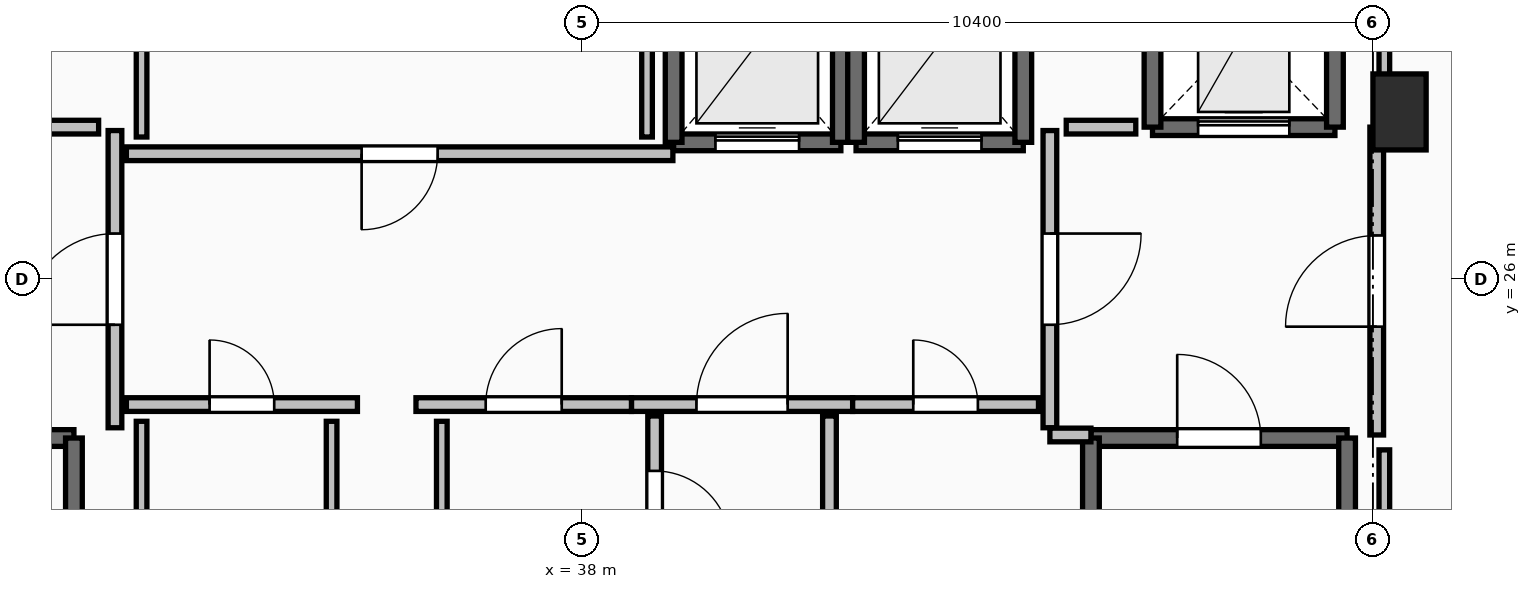
"""IFC4 building model, lengths in metres.
Left out: names, types, materials, properties, quantities, classifications, styles, units other than length and angle.
Written with IfcOpenShell. Run it as: python <this file> out.ifc"""

import sys

from ifc_helpers import new_model, si_unit, direction, frame, frame_2d, origin, origin_2d, place, context, subcontext, project, spatial, rectangle, extrude, element, fill, save


model = new_model("IFC4")
c1 = context("Model", 3, precision=1e-05, world=origin(), true_north=direction((0.0, 1.0)))
c2 = subcontext(c1, "Body", "Model", "MODEL_VIEW")
j1 = project(units=[si_unit("LENGTHUNIT", "METRE"), si_unit("PLANEANGLEUNIT", "RADIAN")], contexts=[c1])
p1 = place(None, origin())
s1 = spatial("IfcSite", under=j1, at=p1, CompositionType="ELEMENT")
p2 = place(p1, origin())
s2 = spatial("IfcBuilding", under=s1, at=p2, CompositionType="ELEMENT")
p3 = place(p2, frame((0.0, 0.0, 237.8)))
s3 = spatial("IfcBuildingStorey", under=s2, at=p3, CompositionType="ELEMENT", Elevation=237.8)
p4 = place(p3, frame((48.75, 28.2, 0.0), z_axis=(0.0, 0.0, 1.0), x_axis=(1.0, 0.0, 0.0)))
e1 = element("IfcColumn", 1, at=p4, inside=s3, PredefinedType="PILASTER", context=c2, shape_type="SweptSolid", body=[
    extrude(rectangle(XDim=0.7, YDim=1.0, at=origin_2d()), origin(), (0.0, 0.0, 1.0), 3.55),
])
p5 = place(p3, frame((27.94, 23.91, 0.0), z_axis=(0.0, 0.0, 1.0), x_axis=(1.0, 0.0, 0.0)))
e2 = element("IfcWall", 2, at=p5, inside=s3, PredefinedType="SOLIDWALL", context=c2, shape_type="SweptSolid", body=[
    extrude(rectangle(XDim=3.37, YDim=0.22, at=frame_2d((1.685, 0.0))), origin(), (0.0, 0.0, 1.0), 3.29),
])
p6 = place(p5, frame((1.135, 0.0, 0.0)))
e3 = element("IfcOpeningElement", 3, at=p6, cuts=e2, PredefinedType="OPENING", context=c2, shape_type="SweptSolid", body=[
    extrude(rectangle(XDim=1.1, YDim=2.15, at=frame_2d((0.55, 1.075))), frame((0.0, 0.125, 0.0), z_axis=(0.0, -1.0, 0.0), x_axis=(1.0, 0.0, 0.0)), (0.0, 0.0, 1.0), 0.25),
])
p7 = place(p3, frame((31.31, 23.91, 0.0), z_axis=(0.0, 0.0, 1.0), x_axis=(0.0, -1.0, 0.0)))
e4 = element("IfcWall", 4, at=p7, inside=s3, PredefinedType="SOLIDWALL", context=c2, shape_type="SweptSolid", body=[
    extrude(rectangle(XDim=7.42, YDim=0.22, at=frame_2d((3.71, 0.0))), origin(), (0.0, 0.0, 1.0), 3.29),
])
p8 = place(p3, frame((44.69, 23.91, 0.0), z_axis=(0.0, 0.0, 1.0), x_axis=(1.0, 0.0, 0.0)))
e5 = element("IfcWall", 5, at=p8, inside=s3, PredefinedType="SOLIDWALL", context=c2, shape_type="SweptSolid", body=[
    extrude(rectangle(XDim=3.37, YDim=0.22, at=frame_2d((1.685, 0.0))), origin(), (0.0, 0.0, 1.0), 3.29),
])
p9 = place(p8, frame((1.135, 0.0, 0.0)))
e6 = element("IfcOpeningElement", 6, at=p9, cuts=e5, PredefinedType="OPENING", context=c2, shape_type="SweptSolid", body=[
    extrude(rectangle(XDim=1.1, YDim=2.15, at=frame_2d((0.55, 1.075))), frame((0.0, 0.125, 0.0), z_axis=(0.0, -1.0, 0.0), x_axis=(1.0, 0.0, 0.0)), (0.0, 0.0, 1.0), 0.25),
])
for number, where, z_axis, x_axis in (
    (7, (48.06, 23.91, 0.0), (0.0, 0.0, 1.0), (0.0, -1.0, 0.0)),
    (8, (44.69, 16.49, 0.0), (0.0, 0.0, 1.0), (0.0, 1.0, 0.0)),
):
    element("IfcWall", number, at=place(p3, frame(where, z_axis=z_axis, x_axis=x_axis)), inside=s3, PredefinedType="SOLIDWALL", context=c2, shape_type="SweptSolid", body=[
        extrude(rectangle(XDim=7.42, YDim=0.22, at=frame_2d((3.71, 0.0))), origin(), (0.0, 0.0, 1.0), 3.29),
    ])
p10 = place(p3, frame((39.2, 27.8, 0.0), z_axis=(0.0, 0.0, 1.0), x_axis=(1.0, 0.0, 0.0)))
e9 = element("IfcWall", 9, at=p10, inside=s3, PredefinedType="SOLIDWALL", context=c2, shape_type="SweptSolid", body=[
    extrude(rectangle(XDim=2.2, YDim=0.22, at=frame_2d((1.1, 0.0))), origin(), (0.0, 0.0, 1.0), 3.29),
])
p11 = place(p10, frame((0.55, 0.0, 0.0)))
e10 = element("IfcOpeningElement", 10, at=p11, cuts=e9, PredefinedType="OPENING", context=c2, shape_type="SweptSolid", body=[
    extrude(rectangle(XDim=1.1, YDim=2.2, at=frame_2d((0.55, 1.1))), frame((0.0, 0.125, 0.0), z_axis=(0.0, -1.0, 0.0), x_axis=(1.0, 0.0, 0.0)), (0.0, 0.0, 1.0), 0.25),
])
for number, where, z_axis, x_axis in (
    (11, (41.4, 27.8, 0.0), (0.0, 0.0, 1.0), (0.0, 1.0, 0.0)),
    (12, (39.2, 30.4, 0.0), (0.0, 0.0, 1.0), (0.0, -1.0, 0.0)),
):
    element("IfcWall", number, at=place(p3, frame(where, z_axis=z_axis, x_axis=x_axis)), inside=s3, PredefinedType="SOLIDWALL", context=c2, shape_type="SweptSolid", body=[
        extrude(rectangle(XDim=2.6, YDim=0.22, at=frame_2d((1.3, 0.0))), origin(), (0.0, 0.0, 1.0), 3.29),
    ])
p12 = place(p3, frame((41.6, 27.8, 0.0), z_axis=(0.0, 0.0, 1.0), x_axis=(1.0, 0.0, 0.0)))
e13 = element("IfcWall", 13, at=p12, inside=s3, PredefinedType="SOLIDWALL", context=c2, shape_type="SweptSolid", body=[
    extrude(rectangle(XDim=2.2, YDim=0.22, at=frame_2d((1.1, 0.0))), origin(), (0.0, 0.0, 1.0), 3.29),
])
p13 = place(p12, frame((0.55, 0.0, 0.0)))
e14 = element("IfcOpeningElement", 14, at=p13, cuts=e13, PredefinedType="OPENING", context=c2, shape_type="SweptSolid", body=[
    extrude(rectangle(XDim=1.1, YDim=2.2, at=frame_2d((0.55, 1.1))), frame((0.0, 0.125, 0.0), z_axis=(0.0, -1.0, 0.0), x_axis=(1.0, 0.0, 0.0)), (0.0, 0.0, 1.0), 0.25),
])
for number, where, z_axis, x_axis in (
    (15, (43.8, 27.8, 0.0), (0.0, 0.0, 1.0), (0.0, 1.0, 0.0)),
    (16, (41.6, 30.4, 0.0), (0.0, 0.0, 1.0), (0.0, -1.0, 0.0)),
):
    element("IfcWall", number, at=place(p3, frame(where, z_axis=z_axis, x_axis=x_axis)), inside=s3, PredefinedType="SOLIDWALL", context=c2, shape_type="SweptSolid", body=[
        extrude(rectangle(XDim=2.6, YDim=0.22, at=frame_2d((1.3, 0.0))), origin(), (0.0, 0.0, 1.0), 3.29),
    ])
p14 = place(p3, frame((45.5, 28.0, 0.0), z_axis=(0.0, 0.0, 1.0), x_axis=(1.0, 0.0, 0.0)))
e17 = element("IfcWall", 17, at=p14, inside=s3, PredefinedType="SHEAR", context=c2, shape_type="SweptSolid", body=[
    extrude(rectangle(XDim=2.4, YDim=0.22, at=frame_2d((1.2, 0.0))), origin(), (0.0, 0.0, 1.0), 3.29),
])
p15 = place(p14, frame((0.6, 0.0, 0.0)))
e18 = element("IfcOpeningElement", 18, at=p15, cuts=e17, PredefinedType="OPENING", context=c2, shape_type="SweptSolid", body=[
    extrude(rectangle(XDim=1.2, YDim=2.2, at=frame_2d((0.6, 1.1))), frame((0.0, 0.125, 0.0), z_axis=(0.0, -1.0, 0.0), x_axis=(1.0, 0.0, 0.0)), (0.0, 0.0, 1.0), 0.25),
])
for number, where, z_axis, x_axis in (
    (19, (47.9, 28.0, 0.0), (0.0, 0.0, 1.0), (0.0, 1.0, 0.0)),
    (20, (45.5, 30.5, 0.0), (0.0, 0.0, 1.0), (0.0, -1.0, 0.0)),
):
    element("IfcWall", number, at=place(p3, frame(where, z_axis=z_axis, x_axis=x_axis)), inside=s3, PredefinedType="SHEAR", context=c2, shape_type="SweptSolid", body=[
        extrude(rectangle(XDim=2.5, YDim=0.22, at=frame_2d((1.25, 0.0))), origin(), (0.0, 0.0, 1.0), 3.29),
    ])
p16 = place(p3, frame((31.85, 24.045, 0.0), z_axis=(0.0, 0.0, 1.0), x_axis=(0.0, 1.0, 0.0)))
e21 = element("IfcWall", 21, at=p16, inside=s3, PredefinedType="PARTITIONING", context=c2, shape_type="SweptSolid", body=[
    extrude(rectangle(XDim=3.91, YDim=0.18, at=frame_2d((1.955, 0.0))), origin(), (0.0, 0.0, 1.0), 3.29),
])
p17 = place(p16, frame((1.355, 0.0, 0.0)))
e22 = element("IfcOpeningElement", 22, at=p17, cuts=e21, PredefinedType="OPENING", context=c2, shape_type="SweptSolid", body=[
    extrude(rectangle(XDim=1.2, YDim=2.15, at=frame_2d((0.6, 1.075))), frame((0.0, 0.105, 0.0), z_axis=(0.0, -1.0, 0.0), x_axis=(1.0, 0.0, 0.0)), (0.0, 0.0, 1.0), 0.21),
])
p18 = place(p3, frame((44.15, 27.955, 0.0), z_axis=(0.0, 0.0, 1.0), x_axis=(0.0, -1.0, 0.0)))
e23 = element("IfcWall", 23, at=p18, inside=s3, PredefinedType="PARTITIONING", context=c2, shape_type="SweptSolid", body=[
    extrude(rectangle(XDim=3.91, YDim=0.18, at=frame_2d((1.955, 0.0))), origin(), (0.0, 0.0, 1.0), 3.29),
])
p19 = place(p18, frame((1.355, 0.0, 0.0)))
e24 = element("IfcOpeningElement", 24, at=p19, cuts=e23, PredefinedType="OPENING", context=c2, shape_type="SweptSolid", body=[
    extrude(rectangle(XDim=1.2, YDim=2.15, at=frame_2d((0.6, 1.075))), frame((0.0, 0.105, 0.0), z_axis=(0.0, -1.0, 0.0), x_axis=(1.0, 0.0, 0.0)), (0.0, 0.0, 1.0), 0.21),
])
p20 = place(p3, frame((44.15, 23.95, 0.0), z_axis=(0.0, 0.0, 1.0), x_axis=(1.0, 0.0, 0.0)))
e25 = element("IfcWall", 25, at=p20, inside=s3, PredefinedType="PARTITIONING", context=c2, shape_type="SweptSolid", body=[
    extrude(rectangle(XDim=0.54, YDim=0.18, at=frame_2d((0.27, 0.0))), origin(), (0.0, 0.0, 1.0), 3.29),
])
p21 = place(p3, frame((48.45, 23.95, 0.0), z_axis=(0.0, 0.0, 1.0), x_axis=(0.0, 1.0, 0.0)))
e26 = element("IfcWall", 26, at=p21, inside=s3, PredefinedType="PARTITIONING", context=c2, shape_type="SweptSolid", body=[
    extrude(rectangle(XDim=4.05, YDim=0.18, at=frame_2d((2.025, 0.0))), origin(), (0.0, 0.0, 1.0), 3.29),
])
p22 = place(p21, frame((1.425, 0.0, 0.0)))
e27 = element("IfcOpeningElement", 27, at=p22, cuts=e26, PredefinedType="OPENING", context=c2, shape_type="SweptSolid", body=[
    extrude(rectangle(XDim=1.2, YDim=2.15, at=frame_2d((0.6, 1.075))), frame((0.0, 0.105, 0.0), z_axis=(0.0, -1.0, 0.0), x_axis=(1.0, 0.0, 0.0)), (0.0, 0.0, 1.0), 0.21),
])
p23 = place(p3, frame((38.645, 24.35, 0.0), z_axis=(0.0, 0.0, 1.0), x_axis=(1.0, 0.0, 0.0)))
e28 = element("IfcWall", 28, at=p23, inside=s3, PredefinedType="PARTITIONING", context=c2, shape_type="SweptSolid", body=[
    extrude(rectangle(XDim=2.91, YDim=0.18, at=frame_2d((1.455, 0.0))), origin(), (0.0, 0.0, 1.0), 3.29),
])
p24 = place(p23, frame((0.855, 0.0, 0.0)))
e29 = element("IfcOpeningElement", 29, at=p24, cuts=e28, PredefinedType="OPENING", context=c2, shape_type="SweptSolid", body=[
    extrude(rectangle(XDim=1.2, YDim=2.15, at=frame_2d((0.6, 1.075))), frame((0.0, 0.105, 0.0), z_axis=(0.0, -1.0, 0.0), x_axis=(1.0, 0.0, 0.0)), (0.0, 0.0, 1.0), 0.21),
])
p25 = place(p3, frame((41.555, 24.35, 0.0), z_axis=(0.0, 0.0, 1.0), x_axis=(1.0, 0.0, 0.0)))
e30 = element("IfcWall", 30, at=p25, inside=s3, PredefinedType="PARTITIONING", context=c2, shape_type="SweptSolid", body=[
    extrude(rectangle(XDim=2.445, YDim=0.18, at=frame_2d((1.223, 0.0))), origin(), (0.0, 0.0, 1.0), 3.29),
])
p26 = place(p25, frame((0.798, 0.0, 0.0)))
e31 = element("IfcOpeningElement", 31, at=p26, cuts=e30, PredefinedType="OPENING", context=c2, shape_type="SweptSolid", body=[
    extrude(rectangle(XDim=0.85, YDim=2.1, at=frame_2d((0.425, 1.05))), frame((0.0, 0.105, 0.0), z_axis=(0.0, -1.0, 0.0), x_axis=(1.0, 0.0, 0.0)), (0.0, 0.0, 1.0), 0.21),
])
p27 = place(p3, frame((39.19, 27.65, 0.0), z_axis=(0.0, 0.0, 1.0), x_axis=(-1.0, 0.0, 0.0)))
e32 = element("IfcWall", 32, at=p27, inside=s3, PredefinedType="PARTITIONING", context=c2, shape_type="SweptSolid", body=[
    extrude(rectangle(XDim=7.19, YDim=0.18, at=frame_2d((3.595, 0.0))), origin(), (0.0, 0.0, 1.0), 3.29),
])
p28 = place(p27, frame((3.095, 0.0, 0.0)))
e33 = element("IfcOpeningElement", 33, at=p28, cuts=e32, PredefinedType="OPENING", context=c2, shape_type="SweptSolid", body=[
    extrude(rectangle(XDim=1.0, YDim=2.15, at=frame_2d((0.5, 1.075))), frame((0.0, 0.105, 0.0), z_axis=(0.0, -1.0, 0.0), x_axis=(1.0, 0.0, 0.0)), (0.0, 0.0, 1.0), 0.21),
])
p29 = place(p3, frame((32.0, 24.35, 0.0), z_axis=(0.0, 0.0, 1.0), x_axis=(1.0, 0.0, 0.0)))
e34 = element("IfcWall", 34, at=p29, inside=s3, PredefinedType="PARTITIONING", context=c2, shape_type="SweptSolid", body=[
    extrude(rectangle(XDim=3.04, YDim=0.18, at=frame_2d((1.52, 0.0))), origin(), (0.0, 0.0, 1.0), 3.29),
])
p30 = place(p29, frame((1.095, 0.0, 0.0)))
e35 = element("IfcOpeningElement", 35, at=p30, cuts=e34, PredefinedType="OPENING", context=c2, shape_type="SweptSolid", body=[
    extrude(rectangle(XDim=0.85, YDim=2.1, at=frame_2d((0.425, 1.05))), frame((0.0, 0.105, 0.0), z_axis=(0.0, -1.0, 0.0), x_axis=(1.0, 0.0, 0.0)), (0.0, 0.0, 1.0), 0.21),
])
p31 = place(p3, frame((35.81, 24.35, 0.0), z_axis=(0.0, 0.0, 1.0), x_axis=(1.0, 0.0, 0.0)))
e36 = element("IfcWall", 36, at=p31, inside=s3, PredefinedType="PARTITIONING", context=c2, shape_type="SweptSolid", body=[
    extrude(rectangle(XDim=2.835, YDim=0.18, at=frame_2d((1.417, 0.0))), origin(), (0.0, 0.0, 1.0), 3.29),
])
p32 = place(p31, frame((0.917, 0.0, 0.0)))
e37 = element("IfcOpeningElement", 37, at=p32, cuts=e36, PredefinedType="OPENING", context=c2, shape_type="SweptSolid", body=[
    extrude(rectangle(XDim=1.0, YDim=2.15, at=frame_2d((0.5, 1.075))), frame((0.0, 0.105, 0.0), z_axis=(0.0, -1.0, 0.0), x_axis=(1.0, 0.0, 0.0)), (0.0, 0.0, 1.0), 0.21),
])
p33 = place(p3, frame((41.25, 20.305, 0.0), z_axis=(0.0, 0.0, 1.0), x_axis=(0.0, 1.0, 0.0)))
e38 = element("IfcWall", 38, at=p33, inside=s3, PredefinedType="PARTITIONING", context=c2, shape_type="SweptSolid", body=[
    extrude(rectangle(XDim=3.895, YDim=0.18, at=frame_2d((1.948, 0.0))), origin(), (0.0, 0.0, 1.0), 2.482),
])
p34 = place(p33, frame((1.522, 0.0, 0.0)))
e39 = element("IfcOpeningElement", 39, at=p34, cuts=e38, PredefinedType="OPENING", context=c2, shape_type="SweptSolid", body=[
    extrude(rectangle(XDim=0.85, YDim=2.1, at=frame_2d((0.425, 1.05))), frame((0.0, 0.105, 0.0), z_axis=(0.0, -1.0, 0.0), x_axis=(1.0, 0.0, 0.0)), (0.0, 0.0, 1.0), 0.21),
])
p35 = place(p3, frame((38.95, 24.2, 0.0), z_axis=(0.0, 0.0, 1.0), x_axis=(0.0, -1.0, 0.0)))
e40 = element("IfcWall", 40, at=p35, inside=s3, PredefinedType="PARTITIONING", context=c2, shape_type="SweptSolid", body=[
    extrude(rectangle(XDim=2.445, YDim=0.18, at=frame_2d((1.223, 0.0))), origin(), (0.0, 0.0, 1.0), 2.482),
])
p36 = place(p35, frame((0.722, 0.0, 0.0)))
e41 = element("IfcOpeningElement", 41, at=p36, cuts=e40, PredefinedType="OPENING", context=c2, shape_type="SweptSolid", body=[
    extrude(rectangle(XDim=1.0, YDim=2.15, at=frame_2d((0.5, 1.075))), frame((0.0, 0.105, 0.0), z_axis=(0.0, -1.0, 0.0), x_axis=(1.0, 0.0, 0.0)), (0.0, 0.0, 1.0), 0.21),
])
for number, where, z_axis, x_axis in (
    (42, (31.635, 28.0, 0.0), (0.0, 0.0, 1.0), (-1.0, 0.0, 0.0)),
    (43, (45.28, 28.0, 0.0), (0.0, 0.0, 1.0), (-1.0, 0.0, 0.0)),
):
    element("IfcWall", number, at=place(p3, frame(where, z_axis=z_axis, x_axis=x_axis)), inside=s3, PredefinedType="PARTITIONING", context=c2, shape_type="SweptSolid", body=[
        extrude(rectangle(XDim=0.915, YDim=0.18, at=frame_2d((0.458, 0.0))), origin(), (0.0, 0.0, 1.0), 3.29),
    ])
for number, where, z_axis, x_axis in (
    (44, (32.2, 30.26, 0.0), (0.0, 0.0, 1.0), (0.0, -1.0, 0.0)),
    (45, (38.85, 27.87, 0.0), (0.0, 0.0, 1.0), (0.0, 1.0, 0.0)),
):
    element("IfcWall", number, at=place(p3, frame(where, z_axis=z_axis, x_axis=x_axis)), inside=s3, PredefinedType="PARTITIONING", context=c2, shape_type="SweptSolid", body=[
        extrude(rectangle(XDim=2.39, YDim=0.14, at=frame_2d((1.195, 0.0))), origin(), (0.0, 0.0, 1.0), 3.29),
    ])
for number, where, z_axis, x_axis in (
    (46, (32.2, 24.13, 0.0), (0.0, 0.0, 1.0), (0.0, -1.0, 0.0)),
    (47, (34.7, 21.67, 0.0), (0.0, 0.0, 1.0), (0.0, 1.0, 0.0)),
    (48, (36.15, 24.13, 0.0), (0.0, 0.0, 1.0), (0.0, -1.0, 0.0)),
):
    element("IfcWall", number, at=place(p3, frame(where, z_axis=z_axis, x_axis=x_axis)), inside=s3, PredefinedType="PARTITIONING", context=c2, shape_type="SweptSolid", body=[
        extrude(rectangle(XDim=2.46, YDim=0.14, at=frame_2d((1.23, 0.0))), origin(), (0.0, 0.0, 1.0), 2.482),
    ])
p37 = place(p3, frame((48.55, 16.24, 0.0), z_axis=(0.0, 0.0, 1.0), x_axis=(0.0, 1.0, 0.0)))
e49 = element("IfcWall", 49, at=p37, inside=s3, PredefinedType="PARTITIONING", context=c2, shape_type="SweptSolid", body=[
    extrude(rectangle(XDim=7.514, YDim=0.14, at=frame_2d((3.757, 0.0))), origin(), (0.0, 0.0, 1.0), 2.482),
])
p38 = place(p3, frame((48.55, 28.196, 0.0), z_axis=(0.0, 0.0, 1.0), x_axis=(0.0, 1.0, 0.0)))
e50 = element("IfcWall", 50, at=p38, inside=s3, PredefinedType="PARTITIONING", context=c2, shape_type="SweptSolid", body=[
    extrude(rectangle(XDim=5.254, YDim=0.14, at=frame_2d((2.627, 0.0))), origin(), (0.0, 0.0, 1.0), 2.482),
])
p39 = place(p9, origin())
e51 = element("IfcDoor", 51, at=p39, inside=s3, OperationType="SINGLE_SWING_LEFT", PredefinedType="DOOR", context=c2, shape_type="SweptSolid", body=[
    extrude(rectangle(XDim=1.1, YDim=2.15, at=frame_2d((0.55, 1.075))), frame((0.0, 0.025, 0.0), z_axis=(0.0, -1.0, 0.0), x_axis=(1.0, 0.0, 0.0)), (0.0, 0.0, 1.0), 0.05),
])
fill(e6, e51)
p40 = place(p11, origin())
e52 = element("IfcDoor", 52, at=p40, inside=s3, OperationType="SLIDING_TO_LEFT", PredefinedType="DOOR", context=c2, shape_type="SweptSolid", body=[
    extrude(rectangle(XDim=1.1, YDim=2.2, at=frame_2d((0.55, 1.1))), frame((0.0, 0.025, 0.0), z_axis=(0.0, -1.0, 0.0), x_axis=(1.0, 0.0, 0.0)), (0.0, 0.0, 1.0), 0.05),
])
fill(e10, e52)
p41 = place(p13, origin())
e53 = element("IfcDoor", 53, at=p41, inside=s3, OperationType="SLIDING_TO_LEFT", PredefinedType="DOOR", context=c2, shape_type="SweptSolid", body=[
    extrude(rectangle(XDim=1.1, YDim=2.2, at=frame_2d((0.55, 1.1))), frame((0.0, 0.025, 0.0), z_axis=(0.0, -1.0, 0.0), x_axis=(1.0, 0.0, 0.0)), (0.0, 0.0, 1.0), 0.05),
])
fill(e14, e53)
p42 = place(p15, origin())
e54 = element("IfcDoor", 54, at=p42, inside=s3, OperationType="SLIDING_TO_LEFT", PredefinedType="DOOR", context=c2, shape_type="SweptSolid", body=[
    extrude(rectangle(XDim=1.2, YDim=2.2, at=frame_2d((0.6, 1.1))), frame((0.0, 0.025, 0.0), z_axis=(0.0, -1.0, 0.0), x_axis=(1.0, 0.0, 0.0)), (0.0, 0.0, 1.0), 0.05),
])
fill(e18, e54)
p43 = place(p17, origin())
e55 = element("IfcDoor", 55, at=p43, inside=s3, OperationType="SINGLE_SWING_LEFT", PredefinedType="DOOR", context=c2, shape_type="SweptSolid", body=[
    extrude(rectangle(XDim=1.2, YDim=2.15, at=frame_2d((0.6, 1.075))), frame((0.0, 0.025, 0.0), z_axis=(0.0, -1.0, 0.0), x_axis=(1.0, 0.0, 0.0)), (0.0, 0.0, 1.0), 0.05),
])
fill(e22, e55)
p44 = place(p19, origin())
e56 = element("IfcDoor", 56, at=p44, inside=s3, OperationType="SINGLE_SWING_LEFT", PredefinedType="DOOR", context=c2, shape_type="SweptSolid", body=[
    extrude(rectangle(XDim=1.2, YDim=2.15, at=frame_2d((0.6, 1.075))), frame((0.0, 0.025, 0.0), z_axis=(0.0, -1.0, 0.0), x_axis=(1.0, 0.0, 0.0)), (0.0, 0.0, 1.0), 0.05),
])
fill(e24, e56)
p45 = place(p22, origin())
e57 = element("IfcDoor", 57, at=p45, inside=s3, OperationType="SINGLE_SWING_LEFT", PredefinedType="DOOR", context=c2, shape_type="SweptSolid", body=[
    extrude(rectangle(XDim=1.2, YDim=2.15, at=frame_2d((0.6, 1.075))), frame((0.0, 0.025, 0.0), z_axis=(0.0, -1.0, 0.0), x_axis=(1.0, 0.0, 0.0)), (0.0, 0.0, 1.0), 0.05),
])
fill(e27, e57)
p46 = place(p24, origin())
e58 = element("IfcDoor", 58, at=p46, inside=s3, OperationType="SINGLE_SWING_RIGHT", PredefinedType="DOOR", context=c2, shape_type="SweptSolid", body=[
    extrude(rectangle(XDim=1.2, YDim=2.15, at=frame_2d((0.6, 1.075))), frame((0.0, 0.025, 0.0), z_axis=(0.0, -1.0, 0.0), x_axis=(1.0, 0.0, 0.0)), (0.0, 0.0, 1.0), 0.05),
])
fill(e29, e58)
p47 = place(p26, origin())
e59 = element("IfcDoor", 59, at=p47, inside=s3, OperationType="SINGLE_SWING_LEFT", PredefinedType="DOOR", context=c2, shape_type="SweptSolid", body=[
    extrude(rectangle(XDim=0.85, YDim=2.1, at=frame_2d((0.425, 1.05))), frame((0.0, 0.025, 0.0), z_axis=(0.0, -1.0, 0.0), x_axis=(1.0, 0.0, 0.0)), (0.0, 0.0, 1.0), 0.05),
])
fill(e31, e59)
p48 = place(p28, origin())
e60 = element("IfcDoor", 60, at=p48, inside=s3, OperationType="SINGLE_SWING_RIGHT", PredefinedType="DOOR", context=c2, shape_type="SweptSolid", body=[
    extrude(rectangle(XDim=1.0, YDim=2.15, at=frame_2d((0.5, 1.075))), frame((0.0, 0.025, 0.0), z_axis=(0.0, -1.0, 0.0), x_axis=(1.0, 0.0, 0.0)), (0.0, 0.0, 1.0), 0.05),
])
fill(e33, e60)
p49 = place(p30, origin())
e61 = element("IfcDoor", 61, at=p49, inside=s3, OperationType="SINGLE_SWING_LEFT", PredefinedType="DOOR", context=c2, shape_type="SweptSolid", body=[
    extrude(rectangle(XDim=0.85, YDim=2.1, at=frame_2d((0.425, 1.05))), frame((0.0, 0.025, 0.0), z_axis=(0.0, -1.0, 0.0), x_axis=(1.0, 0.0, 0.0)), (0.0, 0.0, 1.0), 0.05),
])
fill(e35, e61)
p50 = place(p32, origin())
e62 = element("IfcDoor", 62, at=p50, inside=s3, OperationType="SINGLE_SWING_RIGHT", PredefinedType="DOOR", context=c2, shape_type="SweptSolid", body=[
    extrude(rectangle(XDim=1.0, YDim=2.15, at=frame_2d((0.5, 1.075))), frame((0.0, 0.025, 0.0), z_axis=(0.0, -1.0, 0.0), x_axis=(1.0, 0.0, 0.0)), (0.0, 0.0, 1.0), 0.05),
])
fill(e37, e62)
p51 = place(p36, origin())
e63 = element("IfcDoor", 63, at=p51, inside=s3, OperationType="SINGLE_SWING_RIGHT", PredefinedType="DOOR", context=c2, shape_type="SweptSolid", body=[
    extrude(rectangle(XDim=1.0, YDim=2.15, at=frame_2d((0.5, 1.075))), frame((0.0, 0.025, 0.0), z_axis=(0.0, -1.0, 0.0), x_axis=(1.0, 0.0, 0.0)), (0.0, 0.0, 1.0), 0.05),
])
fill(e41, e63)
save(model, sys.argv[1])
